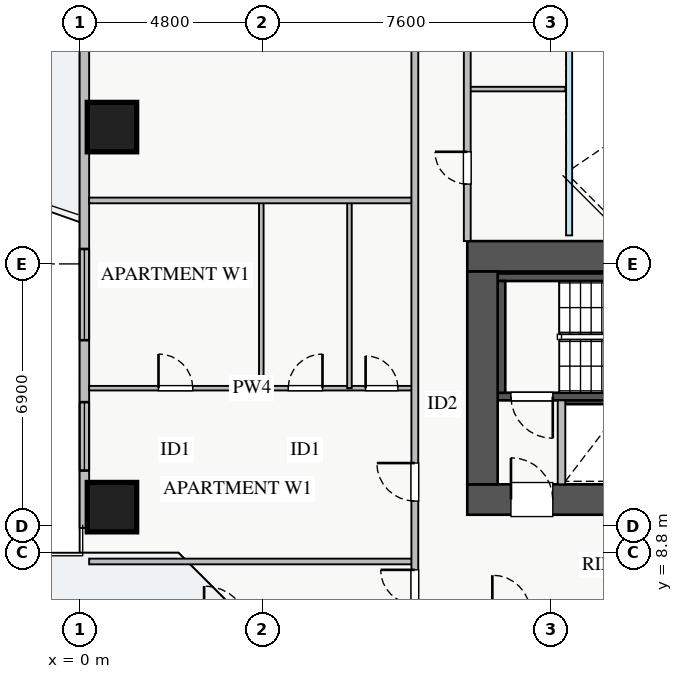
"""IFC4 building model, lengths in metres.
Left out: names, types, materials, properties, quantities, classifications, styles, units other than length and angle.
Written with IfcOpenShell. Run it as: python <this file> out.ifc"""

import sys

from ifc_helpers import new_model, si_unit, direction, frame, frame_2d, origin, origin_2d, place, context, subcontext, project, spatial, rectangle, extrude, source, transform, mapped, element, fill, save


model = new_model("IFC4")
c1 = context("Model", 3, precision=1e-05, world=origin(), true_north=direction((0.0, 1.0)))
c2 = subcontext(c1, "Body", "Model", "MODEL_VIEW")
j1 = project(units=[si_unit("LENGTHUNIT", "METRE"), si_unit("PLANEANGLEUNIT", "RADIAN")], contexts=[c1])
p1 = place(None, origin())
s1 = spatial("IfcSite", under=j1, at=p1, CompositionType="ELEMENT")
p2 = place(p1, origin())
s2 = spatial("IfcBuilding", under=s1, at=p2, CompositionType="ELEMENT")
p3 = place(p2, frame((0.0, 0.0, 53.5)))
s3 = spatial("IfcBuildingStorey", under=s2, at=p3, CompositionType="ELEMENT", Elevation=53.5)
p4 = place(p3, frame((12.68, 12.8, 0.0), z_axis=(0.0, 0.0, 1.0), x_axis=(1.0, 0.0, 0.0)))
e1 = element("IfcWall", 1, at=p4, inside=s3, PredefinedType="SHEAR", context=c2, shape_type="SweptSolid", body=[
    extrude(rectangle(XDim=1.94, YDim=0.18, at=frame_2d((0.97, 0.0))), origin(), (0.0, 0.0, 1.0), 3.07),
])
p5 = place(p3, frame((11.0, 12.91, 0.0), z_axis=(0.0, 0.0, 1.0), x_axis=(1.0, 0.0, 0.0)))
e2 = element("IfcWall", 2, at=p5, inside=s3, PredefinedType="SHEAR", context=c2, shape_type="SweptSolid", body=[
    extrude(rectangle(XDim=7.15, YDim=0.2, at=frame_2d((3.575, 0.0))), origin(), (0.0, 0.0, 1.0), 3.25),
])
p6 = place(p5, frame((0.35, 0.0, 0.0)))
e3 = element("IfcOpeningElement", 3, at=p6, cuts=e2, PredefinedType="OPENING", context=c2, shape_type="SweptSolid", body=[
    extrude(rectangle(XDim=1.1, YDim=2.05, at=frame_2d((0.55, 1.025))), frame((0.0, 0.11, 0.0), z_axis=(0.0, -1.0, 0.0), x_axis=(1.0, 0.0, 0.0)), (0.0, 0.0, 1.0), 0.22),
])
p7 = place(p3, frame((11.0, 16.05, 0.0), z_axis=(0.0, 0.0, 1.0), x_axis=(1.0, 0.0, 0.0)))
e4 = element("IfcWall", 4, at=p7, inside=s3, PredefinedType="SHEAR", context=c2, shape_type="SweptSolid", body=[
    extrude(rectangle(XDim=7.15, YDim=0.2, at=frame_2d((3.575, 0.0))), origin(), (0.0, 0.0, 1.0), 3.25),
])
p8 = place(p3, frame((11.1, 13.01, 0.0), z_axis=(0.0, 0.0, 1.0), x_axis=(0.0, 1.0, 0.0)))
e5 = element("IfcWall", 5, at=p8, inside=s3, PredefinedType="SHEAR", context=c2, shape_type="SweptSolid", body=[
    extrude(rectangle(XDim=2.94, YDim=0.2, at=frame_2d((1.47, 0.0))), origin(), (0.0, 0.0, 1.0), 3.25),
])
p9 = place(p3, frame((10.2, 10.2, 0.0), z_axis=(0.0, 0.0, 1.0), x_axis=(1.0, 0.0, 0.0)))
e6 = element("IfcWall", 6, at=p9, inside=s3, PredefinedType="SHEAR", context=c2, shape_type="SweptSolid", body=[
    extrude(rectangle(XDim=17.6, YDim=0.8, at=frame_2d((8.8, 0.0))), origin(), (0.0, 0.0, 1.0), 3.25),
])
p10 = place(p9, frame((1.15, 0.0, 0.0)))
e7 = element("IfcOpeningElement", 7, at=p10, cuts=e6, PredefinedType="OPENING", context=c2, shape_type="SweptSolid", body=[
    extrude(rectangle(XDim=1.1, YDim=2.05, at=frame_2d((0.55, 1.025))), frame((0.0, 0.41, 0.0), z_axis=(0.0, -1.0, 0.0), x_axis=(1.0, 0.0, 0.0)), (0.0, 0.0, 1.0), 0.82),
])
p11 = place(p9, frame((8.3, 0.0, 0.0)))
e8 = element("IfcOpeningElement", 8, at=p11, cuts=e6, PredefinedType="OPENING", context=c2, shape_type="SweptSolid", body=[
    extrude(rectangle(XDim=1.1, YDim=2.05, at=frame_2d((0.55, 1.025))), frame((0.0, 0.41, 0.0), z_axis=(0.0, -1.0, 0.0), x_axis=(1.0, 0.0, 0.0)), (0.0, 0.0, 1.0), 0.82),
])
p12 = place(p9, frame((10.05, 0.0, 0.0)))
e9 = element("IfcOpeningElement", 9, at=p12, cuts=e6, PredefinedType="OPENING", context=c2, shape_type="SweptSolid", body=[
    extrude(rectangle(XDim=1.1, YDim=2.05, at=frame_2d((0.55, 1.025))), frame((0.0, 0.41, 0.0), z_axis=(0.0, -1.0, 0.0), x_axis=(1.0, 0.0, 0.0)), (0.0, 0.0, 1.0), 0.82),
])
p13 = place(p9, frame((14.74, 0.0, 0.0)))
e10 = element("IfcOpeningElement", 10, at=p13, cuts=e6, PredefinedType="OPENING", context=c2, shape_type="SweptSolid", body=[
    extrude(rectangle(XDim=1.0, YDim=2.05, at=frame_2d((0.5, 1.025))), frame((0.0, 0.41, 0.0), z_axis=(0.0, -1.0, 0.0), x_axis=(1.0, 0.0, 0.0)), (0.0, 0.0, 1.0), 0.82),
])
p14 = place(p9, frame((11.835, 0.0, 0.0)))
e11 = element("IfcOpeningElement", 11, at=p14, cuts=e6, PredefinedType="OPENING", context=c2, shape_type="SweptSolid", body=[
    extrude(rectangle(XDim=1.0, YDim=2.05, at=frame_2d((0.5, 1.025))), frame((0.0, 0.41, 0.0), z_axis=(0.0, -1.0, 0.0), x_axis=(1.0, 0.0, 0.0)), (0.0, 0.0, 1.0), 0.82),
])
p15 = place(p9, frame((13.37, 0.0, 0.0)))
e12 = element("IfcOpeningElement", 12, at=p15, cuts=e6, PredefinedType="OPENING", context=c2, shape_type="SweptSolid", body=[
    extrude(rectangle(XDim=1.0, YDim=2.05, at=frame_2d((0.5, 1.025))), frame((0.0, 0.41, 0.0), z_axis=(0.0, -1.0, 0.0), x_axis=(1.0, 0.0, 0.0)), (0.0, 0.0, 1.0), 0.82),
])
p16 = place(p3, frame((10.2, 16.6, 0.0), z_axis=(0.0, 0.0, 1.0), x_axis=(1.0, 0.0, 0.0)))
e13 = element("IfcWall", 13, at=p16, inside=s3, PredefinedType="SHEAR", context=c2, shape_type="SweptSolid", body=[
    extrude(rectangle(XDim=17.6, YDim=0.8, at=frame_2d((8.8, 0.0))), origin(), (0.0, 0.0, 1.0), 3.25),
])
p17 = place(p3, frame((10.6, 10.6, 0.0), z_axis=(0.0, 0.0, 1.0), x_axis=(0.0, 1.0, 0.0)))
e14 = element("IfcWall", 14, at=p17, inside=s3, PredefinedType="SHEAR", context=c2, shape_type="SweptSolid", body=[
    extrude(rectangle(XDim=5.6, YDim=0.8, at=frame_2d((2.8, 0.0))), origin(), (0.0, 0.0, 1.0), 3.25),
])
m1 = source(origin(), c2, "Body", "SweptSolid", [
    extrude(rectangle(XDim=1.3, YDim=1.3, at=origin_2d()), origin(), (0.0, 0.0, 1.0), 3.25),
])
for number, where, z_axis, x_axis in (
    (15, (0.85, 20.0, 0.0), (0.0, 0.0, 1.0), (1.0, 0.0, 0.0)),
    (16, (0.85, 10.0, 0.0), (0.0, 0.0, 1.0), (1.0, 0.0, 0.0)),
):
    element("IfcColumn", number, at=place(p3, frame(where, z_axis=z_axis, x_axis=x_axis)), inside=s3, PredefinedType="COLUMN", context=c2, shape_type="MappedRepresentation", body=[
        mapped(m1, transform((0.0, 0.0, 0.0), x_axis=(1.0, 0.0, 0.0), y_axis=(0.0, 1.0, 0.0), z_axis=(0.0, 0.0, 1.0), scale=1.0)),
    ])
p18 = place(p3, frame((0.125, 9.45, 0.0), z_axis=(0.0, 0.0, 1.0), x_axis=(0.0, 1.0, 0.0)))
e17 = element("IfcWall", 17, at=p18, inside=s3, PredefinedType="STANDARD", context=c2, shape_type="SweptSolid", body=[
    extrude(rectangle(XDim=27.1, YDim=0.25, at=frame_2d((13.55, 0.0))), origin(), (0.0, 0.0, 1.0), 2.61),
])
p19 = place(p18, frame((14.4, 0.0, 0.0)))
e18 = element("IfcOpeningElement", 18, at=p19, cuts=e17, PredefinedType="OPENING", context=c2, shape_type="SweptSolid", body=[
    extrude(rectangle(XDim=1.2, YDim=2.1, at=frame_2d((0.6, 1.05))), frame((0.0, 0.135, 0.0), z_axis=(0.0, -1.0, 0.0), x_axis=(1.0, 0.0, 0.0)), (0.0, 0.0, 1.0), 0.27),
])
p20 = place(p18, frame((1.512, 0.0, 0.9)))
e19 = element("IfcOpeningElement", 19, at=p20, cuts=e17, PredefinedType="OPENING", context=c2, shape_type="SweptSolid", body=[
    extrude(rectangle(XDim=1.8, YDim=1.5, at=frame_2d((0.9, 0.75))), frame((0.0, 0.135, 0.0), z_axis=(0.0, -1.0, 0.0), x_axis=(1.0, 0.0, 0.0)), (0.0, 0.0, 1.0), 0.27),
])
p21 = place(p18, frame((23.272, 0.0, 0.9)))
e20 = element("IfcOpeningElement", 20, at=p21, cuts=e17, PredefinedType="OPENING", context=c2, shape_type="SweptSolid", body=[
    extrude(rectangle(XDim=2.1, YDim=1.5, at=frame_2d((1.05, 0.75))), frame((0.0, 0.135, 0.0), z_axis=(0.0, -1.0, 0.0), x_axis=(1.0, 0.0, 0.0)), (0.0, 0.0, 1.0), 0.27),
])
p22 = place(p18, frame((4.942, 0.0, 0.9)))
e21 = element("IfcOpeningElement", 21, at=p22, cuts=e17, PredefinedType="OPENING", context=c2, shape_type="SweptSolid", body=[
    extrude(rectangle(XDim=2.4, YDim=1.5, at=frame_2d((1.2, 0.75))), frame((0.0, 0.135, 0.0), z_axis=(0.0, -1.0, 0.0), x_axis=(1.0, 0.0, 0.0)), (0.0, 0.0, 1.0), 0.27),
])
p23 = place(p18, frame((18.365, 0.0, 0.9)))
e22 = element("IfcOpeningElement", 22, at=p23, cuts=e17, PredefinedType="OPENING", context=c2, shape_type="SweptSolid", body=[
    extrude(rectangle(XDim=0.9, YDim=1.2, at=frame_2d((0.45, 0.6))), frame((0.0, 0.135, 0.0), z_axis=(0.0, -1.0, 0.0), x_axis=(1.0, 0.0, 0.0)), (0.0, 0.0, 1.0), 0.27),
])
p24 = place(p3, frame((12.68, 10.6, 0.0), z_axis=(0.0, 0.0, 1.0), x_axis=(0.0, 1.0, 0.0)))
e23 = element("IfcWall", 23, at=p24, inside=s3, PredefinedType="PARTITIONING", context=c2, shape_type="SweptSolid", body=[
    extrude(rectangle(XDim=2.21, YDim=0.2, at=frame_2d((1.105, 0.0))), origin(), (0.0, 0.0, 1.0), 3.07),
])
p25 = place(p3, frame((0.25, 8.57, 0.0), z_axis=(0.0, 0.0, 1.0), x_axis=(1.0, 0.0, 0.0)))
e24 = element("IfcWall", 24, at=p25, inside=s3, PredefinedType="PARTITIONING", context=c2, shape_type="SweptSolid", body=[
    extrude(rectangle(XDim=8.57, YDim=0.15, at=frame_2d((4.285, 0.0))), origin(), (0.0, 0.0, 1.0), 3.07),
])
p26 = place(p3, frame((0.25, 13.13, 0.0), z_axis=(0.0, 0.0, 1.0), x_axis=(1.0, 0.0, 0.0)))
e25 = element("IfcWall", 25, at=p26, inside=s3, PredefinedType="PLUMBINGWALL", context=c2, shape_type="SweptSolid", body=[
    extrude(rectangle(XDim=8.57, YDim=0.12, at=frame_2d((4.285, 0.0))), origin(), (0.0, 0.0, 1.0), 3.07),
])
p27 = place(p26, frame((1.825, 0.0, 0.0)))
e26 = element("IfcOpeningElement", 26, at=p27, cuts=e25, PredefinedType="OPENING", context=c2, shape_type="SweptSolid", body=[
    extrude(rectangle(XDim=0.9, YDim=2.05, at=frame_2d((0.45, 1.025))), frame((0.0, 0.07, 0.0), z_axis=(0.0, -1.0, 0.0), x_axis=(1.0, 0.0, 0.0)), (0.0, 0.0, 1.0), 0.14),
])
p28 = place(p26, frame((5.24, 0.0, 0.0)))
e27 = element("IfcOpeningElement", 27, at=p28, cuts=e25, PredefinedType="OPENING", context=c2, shape_type="SweptSolid", body=[
    extrude(rectangle(XDim=0.9, YDim=2.05, at=frame_2d((0.45, 1.025))), frame((0.0, 0.07, 0.0), z_axis=(0.0, -1.0, 0.0), x_axis=(1.0, 0.0, 0.0)), (0.0, 0.0, 1.0), 0.14),
])
p29 = place(p26, frame((7.275, 0.0, 0.0)))
e28 = element("IfcOpeningElement", 28, at=p29, cuts=e25, PredefinedType="OPENING", context=c2, shape_type="SweptSolid", body=[
    extrude(rectangle(XDim=0.85, YDim=2.05, at=frame_2d((0.425, 1.025))), frame((0.0, 0.07, 0.0), z_axis=(0.0, -1.0, 0.0), x_axis=(1.0, 0.0, 0.0)), (0.0, 0.0, 1.0), 0.14),
])
for number, where, z_axis, x_axis in (
    (29, (4.78, 13.13, 0.0), (0.0, 0.0, 1.0), (0.0, 1.0, 0.0)),
    (30, (7.1, 13.13, 0.0), (0.0, 0.0, 1.0), (0.0, 1.0, 0.0)),
):
    element("IfcWall", number, at=place(p3, frame(where, z_axis=z_axis, x_axis=x_axis)), inside=s3, PredefinedType="PLUMBINGWALL", context=c2, shape_type="SweptSolid", body=[
        extrude(rectangle(XDim=4.94, YDim=0.12, at=frame_2d((2.47, 0.0))), origin(), (0.0, 0.0, 1.0), 3.07),
    ])
p30 = place(p3, frame((0.25, 18.07, 0.0), z_axis=(0.0, 0.0, 1.0), x_axis=(1.0, 0.0, 0.0)))
e31 = element("IfcWall", 31, at=p30, inside=s3, PredefinedType="PARTITIONING", context=c2, shape_type="SweptSolid", body=[
    extrude(rectangle(XDim=8.57, YDim=0.15, at=frame_2d((4.285, 0.0))), origin(), (0.0, 0.0, 1.0), 2.865),
])
p31 = place(p3, frame((8.82, 7.21, 0.0), z_axis=(0.0, 0.0, 1.0), x_axis=(0.0, 1.0, 0.0)))
e32 = element("IfcWall", 32, at=p31, inside=s3, PredefinedType="PARTITIONING", context=c2, shape_type="SweptSolid", body=[
    extrude(rectangle(XDim=31.23, YDim=0.18, at=frame_2d((15.615, 0.0))), origin(), (0.0, 0.0, 1.0), 3.07),
])
p32 = place(p31, frame((30.09, 0.0, 0.0)))
e33 = element("IfcOpeningElement", 33, at=p32, cuts=e32, PredefinedType="OPENING", context=c2, shape_type="SweptSolid", body=[
    extrude(rectangle(XDim=0.9, YDim=2.05, at=frame_2d((0.45, 1.025))), frame((0.0, 0.1, 0.0), z_axis=(0.0, -1.0, 0.0), x_axis=(1.0, 0.0, 0.0)), (0.0, 0.0, 1.0), 0.2),
])
p33 = place(p31, frame((0.24, 0.0, 0.0)))
e34 = element("IfcOpeningElement", 34, at=p33, cuts=e32, PredefinedType="OPENING", context=c2, shape_type="SweptSolid", body=[
    extrude(rectangle(XDim=0.9, YDim=2.05, at=frame_2d((0.45, 1.025))), frame((0.0, 0.1, 0.0), z_axis=(0.0, -1.0, 0.0), x_axis=(1.0, 0.0, 0.0)), (0.0, 0.0, 1.0), 0.2),
])
p34 = place(p31, frame((2.95, 0.0, 0.0)))
e35 = element("IfcOpeningElement", 35, at=p34, cuts=e32, PredefinedType="OPENING", context=c2, shape_type="SweptSolid", body=[
    extrude(rectangle(XDim=1.0, YDim=2.05, at=frame_2d((0.5, 1.025))), frame((0.0, 0.1, 0.0), z_axis=(0.0, -1.0, 0.0), x_axis=(1.0, 0.0, 0.0)), (0.0, 0.0, 1.0), 0.2),
])
p35 = place(p31, frame((15.115, 0.0, 0.0)))
e36 = element("IfcOpeningElement", 36, at=p35, cuts=e32, PredefinedType="OPENING", context=c2, shape_type="SweptSolid", body=[
    extrude(rectangle(XDim=1.0, YDim=2.05, at=frame_2d((0.5, 1.025))), frame((0.0, 0.1, 0.0), z_axis=(0.0, -1.0, 0.0), x_axis=(1.0, 0.0, 0.0)), (0.0, 0.0, 1.0), 0.2),
])
p36 = place(p31, frame((21.96, 0.0, 0.0)))
e37 = element("IfcOpeningElement", 37, at=p36, cuts=e32, PredefinedType="OPENING", context=c2, shape_type="SweptSolid", body=[
    extrude(rectangle(XDim=1.0, YDim=2.05, at=frame_2d((0.5, 1.025))), frame((0.0, 0.1, 0.0), z_axis=(0.0, -1.0, 0.0), x_axis=(1.0, 0.0, 0.0)), (0.0, 0.0, 1.0), 0.2),
])
p37 = place(p3, frame((10.2, 21.0, 0.0), z_axis=(0.0, 0.0, 1.0), x_axis=(1.0, 0.0, 0.0)))
e38 = element("IfcWall", 38, at=p37, inside=s3, PredefinedType="PLUMBINGWALL", context=c2, shape_type="SweptSolid", body=[
    extrude(rectangle(XDim=2.58, YDim=0.12, at=frame_2d((1.29, 0.0))), origin(), (0.0, 0.0, 1.0), 3.07),
])
p38 = place(p3, frame((10.2, 17.0, 0.0), z_axis=(0.0, 0.0, 1.0), x_axis=(0.0, 1.0, 0.0)))
e39 = element("IfcWall", 39, at=p38, inside=s3, PredefinedType="PARTITIONING", context=c2, shape_type="SweptSolid", body=[
    extrude(rectangle(XDim=12.0, YDim=0.18, at=frame_2d((6.0, 0.0))), origin(), (0.0, 0.0, 1.0), 3.07),
])
p39 = place(p38, frame((1.5, 0.0, 0.0)))
e40 = element("IfcOpeningElement", 40, at=p39, cuts=e39, PredefinedType="OPENING", context=c2, shape_type="SweptSolid", body=[
    extrude(rectangle(XDim=0.85, YDim=2.05, at=frame_2d((0.425, 1.025))), frame((0.0, 0.1, 0.0), z_axis=(0.0, -1.0, 0.0), x_axis=(1.0, 0.0, 0.0)), (0.0, 0.0, 1.0), 0.2),
])
p40 = place(p38, frame((6.5, 0.0, 0.0)))
e41 = element("IfcOpeningElement", 41, at=p40, cuts=e39, PredefinedType="OPENING", context=c2, shape_type="SweptSolid", body=[
    extrude(rectangle(XDim=1.0, YDim=2.05, at=frame_2d((0.5, 1.025))), frame((0.0, 0.1, 0.0), z_axis=(0.0, -1.0, 0.0), x_axis=(1.0, 0.0, 0.0)), (0.0, 0.0, 1.0), 0.2),
])
m2 = source(origin(), c2, "Body", "SweptSolid", [
    extrude(rectangle(XDim=1.8, YDim=1.5, at=frame_2d((0.9, 0.75))), frame((0.0, 0.03, 0.0), z_axis=(0.0, -1.0, 0.0), x_axis=(1.0, 0.0, 0.0)), (0.0, 0.0, 1.0), 0.06),
])
p41 = place(p20, origin())
e42 = element("IfcWindow", 42, at=p41, inside=s3, PartitioningType="TRIPLE_PANEL_VERTICAL", PredefinedType="WINDOW", context=c2, shape_type="MappedRepresentation", body=[
    mapped(m2, transform((0.0, 0.0, 0.0), x_axis=(1.0, 0.0, 0.0), y_axis=(0.0, 1.0, 0.0), z_axis=(0.0, 0.0, 1.0), scale=1.0)),
])
fill(e19, e42)
m3 = source(origin(), c2, "Body", "SweptSolid", [
    extrude(rectangle(XDim=1.1, YDim=2.05, at=frame_2d((0.55, 1.025))), frame((0.0, 0.025, 0.0), z_axis=(0.0, -1.0, 0.0), x_axis=(1.0, 0.0, 0.0)), (0.0, 0.0, 1.0), 0.05),
])
p42 = place(p10, origin())
e43 = element("IfcDoor", 43, at=p42, inside=s3, OperationType="SINGLE_SWING_LEFT", PredefinedType="DOOR", context=c2, shape_type="MappedRepresentation", body=[
    mapped(m3, transform((0.0, 0.0, 0.0), x_axis=(1.0, 0.0, 0.0), y_axis=(0.0, 1.0, 0.0), z_axis=(0.0, 0.0, 1.0), scale=1.0)),
])
fill(e7, e43)
p43 = place(p6, frame((1.1, 0.0, 0.0), z_axis=(0.0, 0.0, 1.0), x_axis=(-1.0, 0.0, 0.0)))
e44 = element("IfcDoor", 44, at=p43, inside=s3, OperationType="SINGLE_SWING_RIGHT", PredefinedType="DOOR", context=c2, shape_type="MappedRepresentation", body=[
    mapped(m3, transform((0.0, 0.0, 0.0), x_axis=(1.0, 0.0, 0.0), y_axis=(0.0, 1.0, 0.0), z_axis=(0.0, 0.0, 1.0), scale=1.0)),
])
fill(e3, e44)
m4 = source(origin(), c2, "Body", "SweptSolid", [
    extrude(rectangle(XDim=0.9, YDim=2.05, at=frame_2d((0.45, 1.025))), frame((0.0, 0.025, 0.0), z_axis=(0.0, -1.0, 0.0), x_axis=(1.0, 0.0, 0.0)), (0.0, 0.0, 1.0), 0.05),
])
p44 = place(p27, origin())
e45 = element("IfcDoor", 45, at=p44, inside=s3, OperationType="SINGLE_SWING_LEFT", PredefinedType="DOOR", context=c2, shape_type="MappedRepresentation", body=[
    mapped(m4, transform((0.0, 0.0, 0.0), x_axis=(1.0, 0.0, 0.0), y_axis=(0.0, 1.0, 0.0), z_axis=(0.0, 0.0, 1.0), scale=1.0)),
])
fill(e26, e45)
p45 = place(p28, origin())
e46 = element("IfcDoor", 46, at=p45, inside=s3, OperationType="SINGLE_SWING_RIGHT", PredefinedType="DOOR", context=c2, shape_type="MappedRepresentation", body=[
    mapped(m4, transform((0.0, 0.0, 0.0), x_axis=(1.0, 0.0, 0.0), y_axis=(0.0, 1.0, 0.0), z_axis=(0.0, 0.0, 1.0), scale=1.0)),
])
fill(e27, e46)
m5 = source(origin(), c2, "Body", "SweptSolid", [
    extrude(rectangle(XDim=0.85, YDim=2.05, at=frame_2d((0.425, 1.025))), frame((0.0, 0.025, 0.0), z_axis=(0.0, -1.0, 0.0), x_axis=(1.0, 0.0, 0.0)), (0.0, 0.0, 1.0), 0.05),
])
p46 = place(p29, origin())
e47 = element("IfcDoor", 47, at=p46, inside=s3, OperationType="SINGLE_SWING_LEFT", PredefinedType="DOOR", context=c2, shape_type="MappedRepresentation", body=[
    mapped(m5, transform((0.0, 0.0, 0.0), x_axis=(1.0, 0.0, 0.0), y_axis=(0.0, 1.0, 0.0), z_axis=(0.0, 0.0, 1.0), scale=1.0)),
])
fill(e28, e47)
p47 = place(p33, origin())
e48 = element("IfcDoor", 48, at=p47, inside=s3, OperationType="SINGLE_SWING_RIGHT", PredefinedType="DOOR", context=c2, shape_type="MappedRepresentation", body=[
    mapped(m4, transform((0.0, 0.0, 0.0), x_axis=(1.0, 0.0, 0.0), y_axis=(0.0, 1.0, 0.0), z_axis=(0.0, 0.0, 1.0), scale=1.0)),
])
fill(e34, e48)
m6 = source(origin(), c2, "Body", "SweptSolid", [
    extrude(rectangle(XDim=1.0, YDim=2.05, at=frame_2d((0.5, 1.025))), frame((0.0, 0.025, 0.0), z_axis=(0.0, -1.0, 0.0), x_axis=(1.0, 0.0, 0.0)), (0.0, 0.0, 1.0), 0.05),
])
p48 = place(p34, origin())
e49 = element("IfcDoor", 49, at=p48, inside=s3, OperationType="SINGLE_SWING_RIGHT", PredefinedType="DOOR", context=c2, shape_type="MappedRepresentation", body=[
    mapped(m6, transform((0.0, 0.0, 0.0), x_axis=(1.0, 0.0, 0.0), y_axis=(0.0, 1.0, 0.0), z_axis=(0.0, 0.0, 1.0), scale=1.0)),
])
fill(e35, e49)
p49 = place(p39, origin())
e50 = element("IfcDoor", 50, at=p49, inside=s3, OperationType="SINGLE_SWING_RIGHT", PredefinedType="DOOR", context=c2, shape_type="MappedRepresentation", body=[
    mapped(m5, transform((0.0, 0.0, 0.0), x_axis=(1.0, 0.0, 0.0), y_axis=(0.0, 1.0, 0.0), z_axis=(0.0, 0.0, 1.0), scale=1.0)),
])
fill(e40, e50)
m7 = source(origin(), c2, "Body", "SweptSolid", [
    extrude(rectangle(XDim=2.4, YDim=1.5, at=frame_2d((1.2, 0.75))), frame((0.0, 0.03, 0.0), z_axis=(0.0, -1.0, 0.0), x_axis=(1.0, 0.0, 0.0)), (0.0, 0.0, 1.0), 0.06),
])
p50 = place(p22, origin())
e51 = element("IfcWindow", 51, at=p50, inside=s3, PartitioningType="TRIPLE_PANEL_VERTICAL", PredefinedType="WINDOW", context=c2, shape_type="MappedRepresentation", body=[
    mapped(m7, transform((0.0, 0.0, 0.0), x_axis=(1.0, 0.0, 0.0), y_axis=(0.0, 1.0, 0.0), z_axis=(0.0, 0.0, 1.0), scale=1.0)),
])
fill(e21, e51)
save(model, sys.argv[1])
